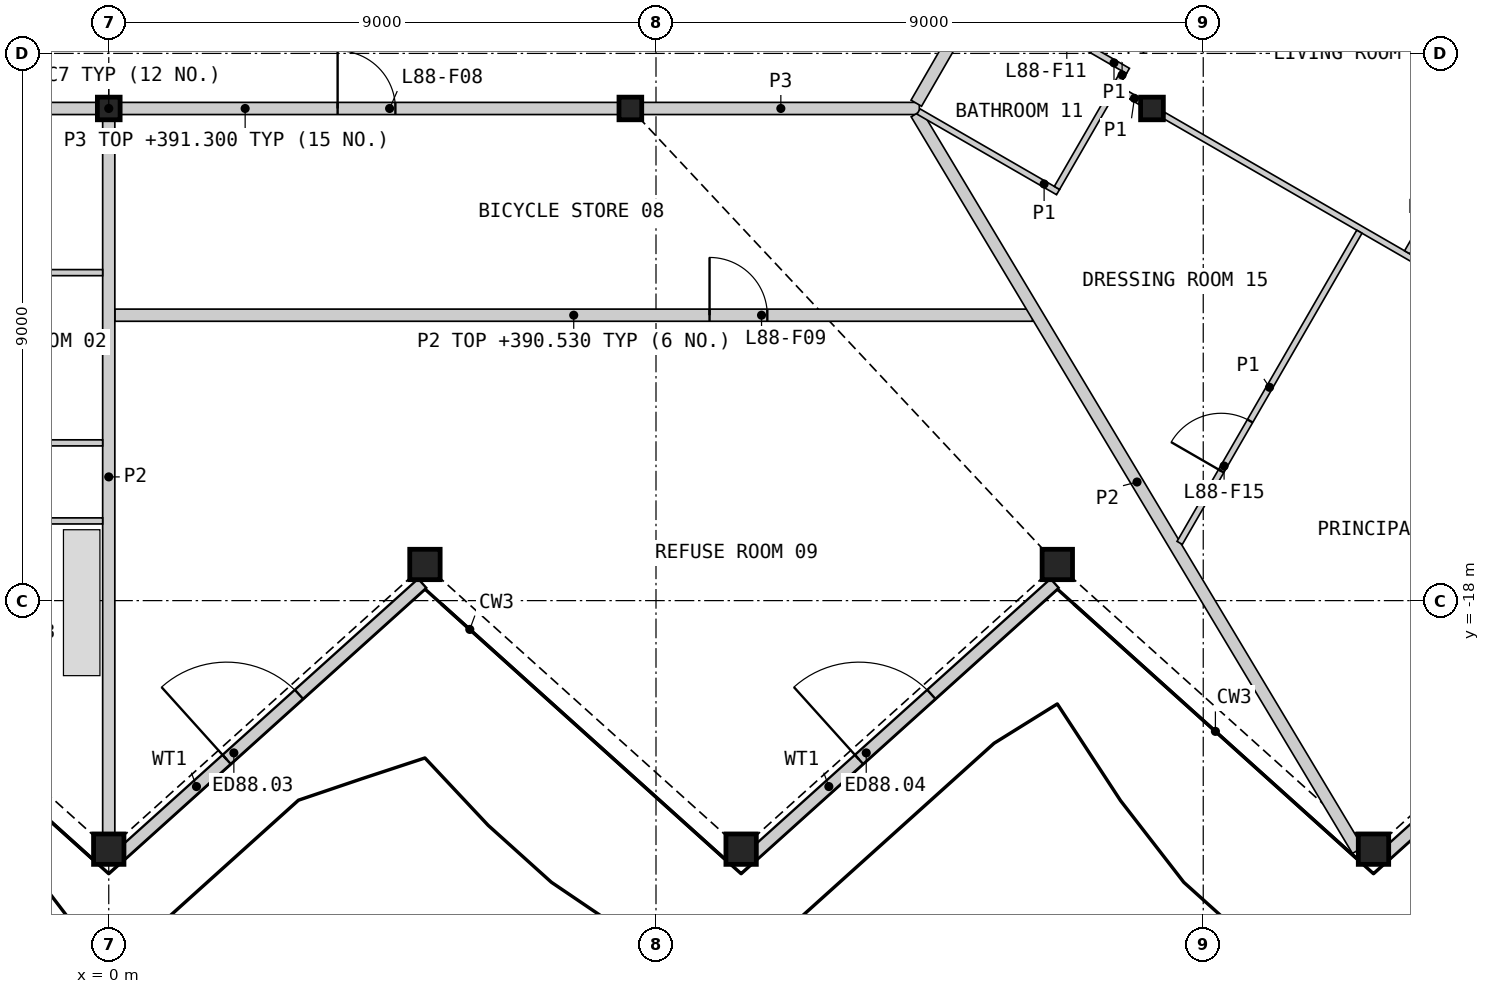
"""IFC4 building model, lengths in metres.
Left out: names, types, materials, properties, quantities, classifications, styles, units other than length and angle.
Written with IfcOpenShell. Run it as: python <this file> out.ifc"""

import sys

from ifc_helpers import new_model, si_unit, direction, frame, frame_2d, origin, origin_2d, place, context, subcontext, project, spatial, rectangle, hollow_rectangle, i_section, extrude, element, fill, save


model = new_model("IFC4")
c1 = context("Model", 3, precision=1e-05, world=origin(), true_north=direction((0.0, 1.0)))
c2 = subcontext(c1, "Body", "Model", "MODEL_VIEW")
j1 = project(units=[si_unit("LENGTHUNIT", "METRE"), si_unit("PLANEANGLEUNIT", "RADIAN")], contexts=[c1])
p1 = place(None, origin())
s1 = spatial("IfcSite", under=j1, at=p1, CompositionType="ELEMENT")
p2 = place(p1, origin())
s2 = spatial("IfcBuilding", under=s1, at=p2, CompositionType="ELEMENT")
p3 = place(p2, frame((0.0, 0.0, 388.2)))
s3 = spatial("IfcBuildingStorey", under=s2, at=p3, CompositionType="ELEMENT", Elevation=388.2)
for number, where, z_axis, x_axis in (
    (1, (0.0, -22.088, 0.0), (0.0, 0.0, 1.0), (1.0, 0.0, 0.0)),
    (2, (5.2, -17.406, 0.0), (0.0, 0.0, 1.0), (1.0, 0.0, 0.0)),
    (3, (10.4, -22.088, 0.0), (0.0, 0.0, 1.0), (1.0, 0.0, 0.0)),
    (4, (15.6, -17.406, 0.0), (0.0, 0.0, 1.0), (1.0, 0.0, 0.0)),
    (5, (20.8, -22.088, 0.0), (0.0, 0.0, 1.0), (1.0, 0.0, 0.0)),
):
    element("IfcColumn", number, at=place(p3, frame(where, z_axis=z_axis, x_axis=x_axis)), inside=s3, PredefinedType="COLUMN", context=c2, shape_type="SweptSolid", body=[
        extrude(hollow_rectangle(XDim=0.5, YDim=0.5, WallThickness=0.03, at=origin_2d()), origin(), (0.0, 0.0, 1.0), 3.4),
    ])
for number, where, z_axis, x_axis in (
    (6, (0.0, -9.906, 0.0), (0.0, 0.0, 1.0), (1.0, 0.0, 0.0)),
    (7, (8.578, -9.906, 0.0), (0.0, 0.0, 1.0), (1.0, 0.0, 0.0)),
    (8, (17.157, -9.906, 0.0), (0.0, 0.0, 1.0), (1.0, 0.0, 0.0)),
):
    element("IfcColumn", number, at=place(p3, frame(where, z_axis=z_axis, x_axis=x_axis)), inside=s3, PredefinedType="COLUMN", context=c2, shape_type="SweptSolid", body=[
        extrude(i_section(OverallWidth=0.374, OverallDepth=0.372, WebThickness=0.016, FlangeThickness=0.026, at=origin_2d()), origin(), (0.0, 0.0, 1.0), 3.4),
    ])
p4 = place(p3, frame((0.205, -22.173, 0.0), z_axis=(0.0, 0.0, 1.0), x_axis=(0.743135582201, 0.669140871915, 0.0)))
e9 = element("IfcWall", 9, at=p4, inside=s3, PredefinedType="SOLIDWALL", context=c2, shape_type="SweptSolid", body=[
    extrude(rectangle(XDim=6.662, YDim=0.2, at=frame_2d((3.331, 0.0))), origin(), (0.0, 0.0, 1.0), 2.634),
])
p5 = place(p4, frame((2.333, 0.0, 0.0)))
e10 = element("IfcOpeningElement", 10, at=p5, cuts=e9, PredefinedType="OPENING", context=c2, shape_type="SweptSolid", body=[
    extrude(rectangle(XDim=1.6, YDim=2.25, at=frame_2d((0.8, 1.125))), frame((0.0, 0.11, 0.0), z_axis=(0.0, -1.0, 0.0), x_axis=(1.0, 0.0, 0.0)), (0.0, 0.0, 1.0), 0.22),
])
p6 = place(p3, frame((10.605, -22.173, 0.0), z_axis=(0.0, 0.0, 1.0), x_axis=(0.743135582201, 0.669140871915, 0.0)))
e11 = element("IfcWall", 11, at=p6, inside=s3, PredefinedType="SOLIDWALL", context=c2, shape_type="SweptSolid", body=[
    extrude(rectangle(XDim=6.662, YDim=0.2, at=frame_2d((3.331, 0.0))), origin(), (0.0, 0.0, 1.0), 2.634),
])
p7 = place(p6, frame((2.333, 0.0, 0.0)))
e12 = element("IfcOpeningElement", 12, at=p7, cuts=e11, PredefinedType="OPENING", context=c2, shape_type="SweptSolid", body=[
    extrude(rectangle(XDim=1.6, YDim=2.25, at=frame_2d((0.8, 1.125))), frame((0.0, 0.11, 0.0), z_axis=(0.0, -1.0, 0.0), x_axis=(1.0, 0.0, 0.0)), (0.0, 0.0, 1.0), 0.22),
])
p8 = place(p3, frame((21.005, -22.173, 0.0), z_axis=(0.0, 0.0, 1.0), x_axis=(0.743135582201, 0.669140871915, 0.0)))
e13 = element("IfcWall", 13, at=p8, inside=s3, PredefinedType="SOLIDWALL", context=c2, shape_type="SweptSolid", body=[
    extrude(rectangle(XDim=6.662, YDim=0.2, at=frame_2d((3.331, 0.0))), origin(), (0.0, 0.0, 1.0), 2.634),
])
p9 = place(p8, frame((2.333, 0.0, 0.0)))
e14 = element("IfcOpeningElement", 14, at=p9, cuts=e13, PredefinedType="OPENING", context=c2, shape_type="SweptSolid", body=[
    extrude(rectangle(XDim=1.6, YDim=2.25, at=frame_2d((0.8, 1.125))), frame((0.0, 0.11, 0.0), z_axis=(0.0, -1.0, 0.0), x_axis=(1.0, 0.0, 0.0)), (0.0, 0.0, 1.0), 0.22),
])
p10 = place(p3, frame((0.197, -9.906, 0.0), z_axis=(0.0, 0.0, 1.0), x_axis=(1.0, 0.0, 0.0)))
e15 = element("IfcWall", 15, at=p10, inside=s3, PredefinedType="PARTITIONING", context=c2, shape_type="SweptSolid", body=[
    extrude(rectangle(XDim=8.185, YDim=0.2, at=frame_2d((4.092, 0.0))), origin(), (0.0, 0.0, 1.0), 3.1),
])
p11 = place(p10, frame((3.567, 0.0, 0.0)))
e16 = element("IfcOpeningElement", 16, at=p11, cuts=e15, PredefinedType="OPENING", context=c2, shape_type="SweptSolid", body=[
    extrude(rectangle(XDim=0.95, YDim=2.1, at=frame_2d((0.475, 1.05))), frame((0.0, 0.11, 0.0), z_axis=(0.0, -1.0, 0.0), x_axis=(1.0, 0.0, 0.0)), (0.0, 0.0, 1.0), 0.22),
])
p12 = place(p3, frame((-8.382, -9.906, 0.0), z_axis=(0.0, 0.0, 1.0), x_axis=(1.0, 0.0, 0.0)))
e17 = element("IfcWall", 17, at=p12, inside=s3, PredefinedType="PARTITIONING", context=c2, shape_type="SweptSolid", body=[
    extrude(rectangle(XDim=8.185, YDim=0.2, at=frame_2d((4.092, 0.0))), origin(), (0.0, 0.0, 1.0), 3.1),
])
p13 = place(p12, frame((5.213, 0.0, 0.0)))
e18 = element("IfcOpeningElement", 18, at=p13, cuts=e17, PredefinedType="OPENING", context=c2, shape_type="SweptSolid", body=[
    extrude(rectangle(XDim=1.0, YDim=2.1, at=frame_2d((0.5, 1.05))), frame((0.0, 0.11, 0.0), z_axis=(0.0, -1.0, 0.0), x_axis=(1.0, 0.0, 0.0)), (0.0, 0.0, 1.0), 0.22),
])
p14 = place(p3, frame((8.775, -9.906, 0.0), z_axis=(0.0, 0.0, 1.0), x_axis=(1.0, 0.0, 0.0)))
e19 = element("IfcWall", 19, at=p14, inside=s3, PredefinedType="PARTITIONING", context=c2, shape_type="SweptSolid", body=[
    extrude(rectangle(XDim=4.555, YDim=0.2, at=frame_2d((2.278, 0.0))), origin(), (0.0, 0.0, 1.0), 3.1),
])
p15 = place(p3, frame((13.281, -9.819, 0.0), z_axis=(0.0, 0.0, 1.0), x_axis=(0.499948957823, 0.866054870994, 0.0)))
e20 = element("IfcWall", 20, at=p15, inside=s3, PredefinedType="PARTITIONING", context=c2, shape_type="SweptSolid", body=[
    extrude(rectangle(XDim=3.701, YDim=0.2, at=frame_2d((1.851, 0.0))), origin(), (0.0, 0.0, 1.0), 3.1),
])
p16 = place(p15, frame((2.451, 0.0, 0.0)))
e21 = element("IfcOpeningElement", 21, at=p16, cuts=e20, PredefinedType="OPENING", context=c2, shape_type="SweptSolid", body=[
    extrude(rectangle(XDim=1.0, YDim=2.1, at=frame_2d((0.5, 1.05))), frame((0.0, 0.11, 0.0), z_axis=(0.0, -1.0, 0.0), x_axis=(1.0, 0.0, 0.0)), (0.0, 0.0, 1.0), 0.22),
])
p17 = place(p3, frame((0.1, -13.306, 0.0), z_axis=(0.0, 0.0, 1.0), x_axis=(1.0, 0.0, 0.0)))
e22 = element("IfcWall", 22, at=p17, inside=s3, PredefinedType="PARTITIONING", context=c2, shape_type="SweptSolid", body=[
    extrude(rectangle(XDim=15.094, YDim=0.2, at=frame_2d((7.547, 0.0))), origin(), (0.0, 0.0, 1.0), 2.33),
])
p18 = place(p17, frame((9.781, 0.0, 0.0)))
e23 = element("IfcOpeningElement", 23, at=p18, cuts=e22, PredefinedType="OPENING", context=c2, shape_type="SweptSolid", body=[
    extrude(rectangle(XDim=0.95, YDim=2.1, at=frame_2d((0.475, 1.05))), frame((0.0, 0.11, 0.0), z_axis=(0.0, -1.0, 0.0), x_axis=(1.0, 0.0, 0.0)), (0.0, 0.0, 1.0), 0.22),
])
p19 = place(p3, frame((13.282, -9.991, 0.0), z_axis=(0.0, 0.0, 1.0), x_axis=(0.513867741763, -0.857869421285, 0.0)))
e24 = element("IfcWall", 24, at=p19, inside=s3, PredefinedType="PARTITIONING", context=c2, shape_type="SweptSolid", body=[
    extrude(rectangle(XDim=14.124, YDim=0.2, at=frame_2d((7.062, 0.0))), origin(), (0.0, 0.0, 1.0), 2.33),
])
p20 = place(p3, frame((0.0, -21.828, 0.0), z_axis=(0.0, 0.0, 1.0), x_axis=(0.0, 1.0, 0.0)))
e25 = element("IfcWall", 25, at=p20, inside=s3, PredefinedType="PARTITIONING", context=c2, shape_type="SweptSolid", body=[
    extrude(rectangle(XDim=11.725, YDim=0.2, at=frame_2d((5.863, 0.0))), origin(), (0.0, 0.0, 1.0), 2.33),
])
p21 = place(p3, frame((17.354, -10.019, 0.0), z_axis=(0.0, 0.0, 1.0), x_axis=(0.866019680922, -0.500009912158, 0.0)))
e26 = element("IfcWall", 26, at=p21, inside=s3, PredefinedType="PARTITIONING", context=c2, shape_type="SweptSolid", body=[
    extrude(rectangle(XDim=10.881, YDim=0.1, at=frame_2d((5.44, 0.0))), origin(), (0.0, 0.0, 1.0), 2.33),
])
p22 = place(p21, frame((8.176, 0.0, 0.0)))
e27 = element("IfcOpeningElement", 27, at=p22, cuts=e26, PredefinedType="OPENING", context=c2, shape_type="SweptSolid", body=[
    extrude(rectangle(XDim=0.95, YDim=2.1, at=frame_2d((0.475, 1.05))), frame((0.0, 0.06, 0.0), z_axis=(0.0, -1.0, 0.0), x_axis=(1.0, 0.0, 0.0)), (0.0, 0.0, 1.0), 0.12),
])
p23 = place(p3, frame((21.354, -12.271, 0.0), z_axis=(0.0, 0.0, 1.0), x_axis=(0.499983931063, 0.866034680991, 0.0)))
e28 = element("IfcWall", 28, at=p23, inside=s3, PredefinedType="PARTITIONING", context=c2, shape_type="SweptSolid", body=[
    extrude(rectangle(XDim=6.358, YDim=0.1, at=frame_2d((3.179, 0.0))), origin(), (0.0, 0.0, 1.0), 2.33),
])
p24 = place(p23, frame((1.252, 0.0, 0.0)))
e29 = element("IfcOpeningElement", 29, at=p24, cuts=e28, PredefinedType="OPENING", context=c2, shape_type="SweptSolid", body=[
    extrude(rectangle(XDim=0.95, YDim=2.1, at=frame_2d((0.475, 1.05))), frame((0.0, 0.06, 0.0), z_axis=(0.0, -1.0, 0.0), x_axis=(1.0, 0.0, 0.0)), (0.0, 0.0, 1.0), 0.12),
])
p25 = place(p3, frame((17.613, -17.051, 0.0), z_axis=(0.0, 0.0, 1.0), x_axis=(0.499982307286, 0.866035618437, 0.0)))
e30 = element("IfcWall", 30, at=p25, inside=s3, PredefinedType="PARTITIONING", context=c2, shape_type="SweptSolid", body=[
    extrude(rectangle(XDim=5.91, YDim=0.1, at=frame_2d((2.955, 0.0))), origin(), (0.0, 0.0, 1.0), 2.33),
])
p26 = place(p25, frame((1.365, 0.0, 0.0)))
e31 = element("IfcOpeningElement", 31, at=p26, cuts=e30, PredefinedType="OPENING", context=c2, shape_type="SweptSolid", body=[
    extrude(rectangle(XDim=0.95, YDim=2.1, at=frame_2d((0.475, 1.05))), frame((0.0, 0.06, 0.0), z_axis=(0.0, -1.0, 0.0), x_axis=(1.0, 0.0, 0.0)), (0.0, 0.0, 1.0), 0.12),
])
p27 = place(p3, frame((-5.15, -16.689, 0.0), z_axis=(0.0, 0.0, 1.0), x_axis=(1.0, 0.0, 0.0)))
e32 = element("IfcWall", 32, at=p27, inside=s3, PredefinedType="PARTITIONING", context=c2, shape_type="SweptSolid", body=[
    extrude(rectangle(XDim=5.05, YDim=0.1, at=frame_2d((2.525, 0.0))), origin(), (0.0, 0.0, 1.0), 2.33),
])
p28 = place(p27, frame((1.25, 0.0, 0.0)))
e33 = element("IfcOpeningElement", 33, at=p28, cuts=e32, PredefinedType="OPENING", context=c2, shape_type="SweptSolid", body=[
    extrude(rectangle(XDim=0.95, YDim=2.1, at=frame_2d((0.475, 1.05))), frame((0.0, 0.06, 0.0), z_axis=(0.0, -1.0, 0.0), x_axis=(1.0, 0.0, 0.0)), (0.0, 0.0, 1.0), 0.12),
])
for number, where, z_axis, x_axis in (
    (34, (-2.65, -12.606, 0.0), (0.0, 0.0, 1.0), (1.0, 0.0, 0.0)),
    (35, (-2.65, -15.406, 0.0), (0.0, 0.0, 1.0), (1.0, 0.0, 0.0)),
):
    element("IfcWall", number, at=place(p3, frame(where, z_axis=z_axis, x_axis=x_axis)), inside=s3, PredefinedType="PARTITIONING", context=c2, shape_type="SweptSolid", body=[
        extrude(rectangle(XDim=2.55, YDim=0.1, at=frame_2d((1.275, 0.0))), origin(), (0.0, 0.0, 1.0), 2.33),
    ])
p29 = place(p3, frame((13.317, -9.956, 0.0), z_axis=(0.0, 0.0, 1.0), x_axis=(0.866052124492, -0.499953715521, 0.0)))
e36 = element("IfcWall", 36, at=p29, inside=s3, PredefinedType="PARTITIONING", context=c2, shape_type="SweptSolid", body=[
    extrude(rectangle(XDim=2.65, YDim=0.1, at=frame_2d((1.325, 0.0))), origin(), (0.0, 0.0, 1.0), 2.33),
])
p30 = place(p3, frame((14.468, -7.964, 0.0), z_axis=(0.0, 0.0, 1.0), x_axis=(0.86603978909, -0.499975083092, 0.0)))
e37 = element("IfcWall", 37, at=p30, inside=s3, PredefinedType="PARTITIONING", context=c2, shape_type="SweptSolid", body=[
    extrude(rectangle(XDim=2.649, YDim=0.1, at=frame_2d((1.325, 0.0))), origin(), (0.0, 0.0, 1.0), 2.33),
])
p31 = place(p30, frame((1.013, 0.0, 0.0)))
e38 = element("IfcOpeningElement", 38, at=p31, cuts=e37, PredefinedType="OPENING", context=c2, shape_type="SweptSolid", body=[
    extrude(rectangle(XDim=0.95, YDim=2.1, at=frame_2d((0.475, 1.05))), frame((0.0, 0.06, 0.0), z_axis=(0.0, -1.0, 0.0), x_axis=(1.0, 0.0, 0.0)), (0.0, 0.0, 1.0), 0.12),
])
p32 = place(p3, frame((15.594, -11.212, 0.0), z_axis=(0.0, 0.0, 1.0), x_axis=(0.500011643316, 0.866018681408, 0.0)))
e39 = element("IfcWall", 39, at=p32, inside=s3, PredefinedType="PARTITIONING", context=c2, shape_type="SweptSolid", body=[
    extrude(rectangle(XDim=1.973, YDim=0.1, at=frame_2d((0.987, 0.0))), origin(), (0.0, 0.0, 1.0), 2.33),
])
p33 = place(p3, frame((16.594, -9.581, 0.0), z_axis=(0.0, 0.0, 1.0), x_axis=(0.866137484628, -0.499805820016, 0.0)))
e40 = element("IfcWall", 40, at=p33, inside=s3, PredefinedType="PARTITIONING", context=c2, shape_type="SweptSolid", body=[
    extrude(rectangle(XDim=0.423, YDim=0.1, at=frame_2d((0.211, 0.0))), origin(), (0.0, 0.0, 1.0), 2.33),
])
p34 = place(p3, frame((16.582, -9.501, 0.0), z_axis=(0.0, 0.0, 1.0), x_axis=(0.498246276801, 0.867035551551, 0.0)))
e41 = element("IfcWall", 41, at=p34, inside=s3, PredefinedType="PARTITIONING", context=c2, shape_type="SweptSolid", body=[
    extrude(rectangle(XDim=0.224, YDim=0.1, at=frame_2d((0.112, 0.0))), origin(), (0.0, 0.0, 1.0), 2.33),
])
p35 = place(p5, origin())
e42 = element("IfcDoor", 42, at=p35, inside=s3, OperationType="DOUBLE_DOOR_SINGLE_SWING", PredefinedType="DOOR", context=c2, shape_type="SweptSolid", body=[
    extrude(rectangle(XDim=1.6, YDim=2.25, at=frame_2d((0.8, 1.125))), frame((0.0, 0.025, 0.0), z_axis=(0.0, -1.0, 0.0), x_axis=(1.0, 0.0, 0.0)), (0.0, 0.0, 1.0), 0.05),
])
fill(e10, e42)
p36 = place(p7, origin())
e43 = element("IfcDoor", 43, at=p36, inside=s3, OperationType="DOUBLE_DOOR_SINGLE_SWING", PredefinedType="DOOR", context=c2, shape_type="SweptSolid", body=[
    extrude(rectangle(XDim=1.6, YDim=2.25, at=frame_2d((0.8, 1.125))), frame((0.0, 0.025, 0.0), z_axis=(0.0, -1.0, 0.0), x_axis=(1.0, 0.0, 0.0)), (0.0, 0.0, 1.0), 0.05),
])
fill(e12, e43)
p37 = place(p11, origin())
e44 = element("IfcDoor", 44, at=p37, inside=s3, OperationType="SINGLE_SWING_LEFT", PredefinedType="DOOR", context=c2, shape_type="SweptSolid", body=[
    extrude(rectangle(XDim=0.95, YDim=2.1, at=frame_2d((0.475, 1.05))), frame((0.0, 0.025, 0.0), z_axis=(0.0, -1.0, 0.0), x_axis=(1.0, 0.0, 0.0)), (0.0, 0.0, 1.0), 0.05),
])
fill(e16, e44)
p38 = place(p18, origin())
e45 = element("IfcDoor", 45, at=p38, inside=s3, OperationType="SINGLE_SWING_LEFT", PredefinedType="DOOR", context=c2, shape_type="SweptSolid", body=[
    extrude(rectangle(XDim=0.95, YDim=2.1, at=frame_2d((0.475, 1.05))), frame((0.0, 0.025, 0.0), z_axis=(0.0, -1.0, 0.0), x_axis=(1.0, 0.0, 0.0)), (0.0, 0.0, 1.0), 0.05),
])
fill(e23, e45)
p39 = place(p26, origin())
e46 = element("IfcDoor", 46, at=p39, inside=s3, OperationType="SINGLE_SWING_LEFT", PredefinedType="DOOR", context=c2, shape_type="SweptSolid", body=[
    extrude(rectangle(XDim=0.95, YDim=2.1, at=frame_2d((0.475, 1.05))), frame((0.0, 0.025, 0.0), z_axis=(0.0, -1.0, 0.0), x_axis=(1.0, 0.0, 0.0)), (0.0, 0.0, 1.0), 0.05),
])
fill(e31, e46)
save(model, sys.argv[1])
